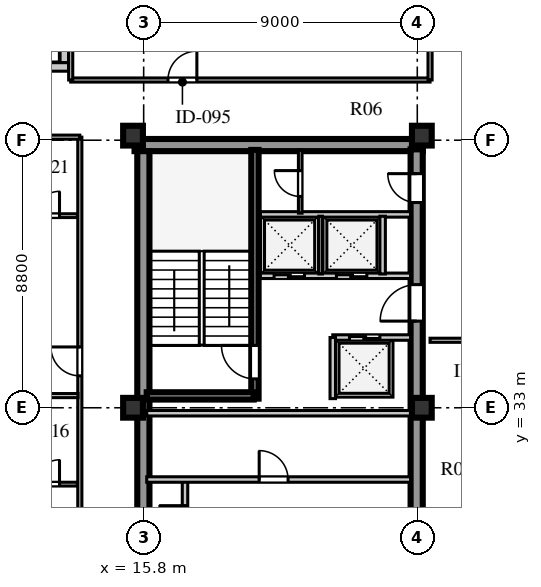
"""IFC4 building model, lengths in metres.
Left out: names, types, materials, properties, quantities, classifications, styles, units other than length and angle.
Written with IfcOpenShell. Run it as: python <this file> out.ifc"""

import sys

from ifc_helpers import new_model, si_unit, direction, frame, frame_2d, origin, origin_2d, place, context, subcontext, project, spatial, rectangle, extrude, element, fill, save


model = new_model("IFC4")
c1 = context("Model", 3, precision=1e-05, world=origin(), true_north=direction((0.0, 1.0)))
c2 = subcontext(c1, "Body", "Model", "MODEL_VIEW")
j1 = project(units=[si_unit("LENGTHUNIT", "METRE"), si_unit("PLANEANGLEUNIT", "RADIAN")], contexts=[c1])
p1 = place(None, origin())
s1 = spatial("IfcSite", under=j1, at=p1, CompositionType="ELEMENT")
p2 = place(p1, origin())
s2 = spatial("IfcBuilding", under=s1, at=p2, CompositionType="ELEMENT")
p3 = place(p2, frame((0.0, 0.0, 229.7)))
s3 = spatial("IfcBuildingStorey", under=s2, at=p3, CompositionType="ELEMENT", Elevation=229.7)
p4 = place(p3, frame((15.5, 41.64, 0.0), z_axis=(0.0, 0.0, 1.0), x_axis=(1.0, 0.0, 0.0)))
e1 = element("IfcWall", 1, at=p4, inside=s3, PredefinedType="SHEAR", context=c2, shape_type="SweptSolid", body=[
    extrude(rectangle(XDim=9.48, YDim=0.4, at=frame_2d((4.74, 0.0))), origin(), (0.0, 0.0, 1.0), 3.66),
])
p5 = place(p3, frame((15.79, 15.81, 0.0), z_axis=(0.0, 0.0, 1.0), x_axis=(0.0, 1.0, 0.0)))
e2 = element("IfcWall", 2, at=p5, inside=s3, PredefinedType="SHEAR", context=c2, shape_type="SweptSolid", body=[
    extrude(rectangle(XDim=25.63, YDim=0.4, at=frame_2d((12.815, 0.0))), origin(), (0.0, 0.0, 1.0), 3.66),
])
p6 = place(p3, frame((24.78, 15.74, 0.0), z_axis=(0.0, 0.0, 1.0), x_axis=(0.0, 1.0, 0.0)))
e3 = element("IfcWall", 3, at=p6, inside=s3, PredefinedType="SHEAR", context=c2, shape_type="SweptSolid", body=[
    extrude(rectangle(XDim=25.76, YDim=0.4, at=frame_2d((12.88, 0.0))), origin(), (0.0, 0.0, 1.0), 3.66),
])
p7 = place(p6, frame((1.61, 0.0, 0.0)))
e4 = element("IfcOpeningElement", 4, at=p7, cuts=e3, PredefinedType="OPENING", context=c2, shape_type="SweptSolid", body=[
    extrude(rectangle(XDim=1.2, YDim=2.1, at=frame_2d((0.6, 1.05))), frame((0.0, 0.21, 0.0), z_axis=(0.0, -1.0, 0.0), x_axis=(1.0, 0.0, 0.0)), (0.0, 0.0, 1.0), 0.42),
])
p8 = place(p6, frame((6.78, 0.0, 0.0)))
e5 = element("IfcOpeningElement", 5, at=p8, cuts=e3, PredefinedType="OPENING", context=c2, shape_type="SweptSolid", body=[
    extrude(rectangle(XDim=0.85, YDim=2.06, at=frame_2d((0.425, 1.03))), frame((0.0, 0.21, 0.0), z_axis=(0.0, -1.0, 0.0), x_axis=(1.0, 0.0, 0.0)), (0.0, 0.0, 1.0), 0.42),
])
p9 = place(p6, frame((12.11, 0.0, 0.0)))
e6 = element("IfcOpeningElement", 6, at=p9, cuts=e3, PredefinedType="OPENING", context=c2, shape_type="SweptSolid", body=[
    extrude(rectangle(XDim=1.5, YDim=2.12, at=frame_2d((0.75, 1.06))), frame((0.0, 0.21, 0.0), z_axis=(0.0, -1.0, 0.0), x_axis=(1.0, 0.0, 0.0)), (0.0, 0.0, 1.0), 0.42),
])
p10 = place(p6, frame((20.11, 0.0, 0.0)))
e7 = element("IfcOpeningElement", 7, at=p10, cuts=e3, PredefinedType="OPENING", context=c2, shape_type="SweptSolid", body=[
    extrude(rectangle(XDim=1.2, YDim=2.12, at=frame_2d((0.6, 1.06))), frame((0.0, 0.21, 0.0), z_axis=(0.0, -1.0, 0.0), x_axis=(1.0, 0.0, 0.0)), (0.0, 0.0, 1.0), 0.42),
])
p11 = place(p6, frame((24.01, 0.0, 0.0)))
e8 = element("IfcOpeningElement", 8, at=p11, cuts=e3, PredefinedType="OPENING", context=c2, shape_type="SweptSolid", body=[
    extrude(rectangle(XDim=0.95, YDim=2.1, at=frame_2d((0.475, 1.05))), frame((0.0, 0.21, 0.0), z_axis=(0.0, -1.0, 0.0), x_axis=(1.0, 0.0, 0.0)), (0.0, 0.0, 1.0), 0.42),
])
for number, where, z_axis, x_axis in (
    (9, (15.45, 33.0, 0.0), (0.0, 0.0, 1.0), (1.0, 0.0, 0.0)),
    (10, (15.45, 41.95, 0.0), (0.0, 0.0, 1.0), (1.0, 0.0, 0.0)),
    (11, (24.95, 33.0, 0.0), (0.0, 0.0, 1.0), (1.0, 0.0, 0.0)),
    (12, (24.95, 41.95, 0.0), (0.0, 0.0, 1.0), (1.0, 0.0, 0.0)),
):
    element("IfcColumn", number, at=place(p3, frame(where, z_axis=z_axis, x_axis=x_axis)), inside=s3, PredefinedType="COLUMN", context=c2, shape_type="SweptSolid", body=[
        extrude(rectangle(XDim=0.65, YDim=0.65, at=origin_2d()), origin(), (0.0, 0.0, 1.0), 3.66),
    ])
p12 = place(p3, frame((13.19, 49.32, 0.0), z_axis=(0.0, 0.0, 1.0), x_axis=(0.0, -1.0, 0.0)))
e13 = element("IfcWall", 13, at=p12, inside=s3, PredefinedType="STANDARD", context=c2, shape_type="SweptSolid", body=[
    extrude(rectangle(XDim=4.97, YDim=0.28, at=frame_2d((2.485, 0.0))), origin(), (0.0, 0.0, 1.0), 3.66),
])
p13 = place(p3, frame((13.33, 44.21, 0.0), z_axis=(0.0, 0.0, 1.0), x_axis=(-1.0, 0.0, 0.0)))
e14 = element("IfcWall", 14, at=p13, inside=s3, PredefinedType="STANDARD", context=c2, shape_type="SweptSolid", body=[
    extrude(rectangle(XDim=5.53, YDim=0.28, at=frame_2d((2.765, 0.0))), origin(), (0.0, 0.0, 1.0), 3.66),
])
p14 = place(p3, frame((17.16, 26.58, 0.0), z_axis=(0.0, 0.0, 1.0), x_axis=(0.0, 1.0, 0.0)))
e15 = element("IfcWall", 15, at=p14, inside=s3, PredefinedType="SOLIDWALL", context=c2, shape_type="SweptSolid", body=[
    extrude(rectangle(XDim=4.02, YDim=0.18, at=frame_2d((2.01, 0.0))), origin(), (0.0, 0.0, 1.0), 3.66),
])
p15 = place(p14, frame((2.35, 0.0, 0.0)))
e16 = element("IfcOpeningElement", 16, at=p15, cuts=e15, PredefinedType="OPENING", context=c2, shape_type="SweptSolid", body=[
    extrude(rectangle(XDim=0.85, YDim=2.06, at=frame_2d((0.425, 1.03))), frame((0.0, 0.1, 0.0), z_axis=(0.0, -1.0, 0.0), x_axis=(1.0, 0.0, 0.0)), (0.0, 0.0, 1.0), 0.2),
])
p16 = place(p3, frame((15.9, 30.64, 0.0), z_axis=(0.0, 0.0, 1.0), x_axis=(1.0, 0.0, 0.0)))
e17 = element("IfcWall", 17, at=p16, inside=s3, PredefinedType="SOLIDWALL", context=c2, shape_type="SweptSolid", body=[
    extrude(rectangle(XDim=8.68, YDim=0.18, at=frame_2d((4.34, 0.0))), origin(), (0.0, 0.0, 1.0), 3.66),
])
p17 = place(p16, frame((3.7, 0.0, 0.0)))
e18 = element("IfcOpeningElement", 18, at=p17, cuts=e17, PredefinedType="OPENING", context=c2, shape_type="SweptSolid", body=[
    extrude(rectangle(XDim=0.95, YDim=2.1, at=frame_2d((0.475, 1.05))), frame((0.0, 0.1, 0.0), z_axis=(0.0, -1.0, 0.0), x_axis=(1.0, 0.0, 0.0)), (0.0, 0.0, 1.0), 0.2),
])
p18 = place(p3, frame((15.9, 32.82, 0.0), z_axis=(0.0, 0.0, 1.0), x_axis=(1.0, 0.0, 0.0)))
e19 = element("IfcWall", 19, at=p18, inside=s3, PredefinedType="SOLIDWALL", context=c2, shape_type="SweptSolid", body=[
    extrude(rectangle(XDim=8.68, YDim=0.18, at=frame_2d((4.34, 0.0))), origin(), (0.0, 0.0, 1.0), 3.06),
])
p19 = place(p3, frame((19.46, 33.3, 0.0), z_axis=(0.0, 0.0, 1.0), x_axis=(0.0, 1.0, 0.0)))
e20 = element("IfcWall", 20, at=p19, inside=s3, PredefinedType="SHEAR", context=c2, shape_type="SweptSolid", body=[
    extrude(rectangle(XDim=8.18, YDim=0.24, at=frame_2d((4.09, 0.0))), origin(), (0.0, 0.0, 1.0), 3.9),
])
p20 = place(p19, frame((0.65, 0.0, 0.0)))
e21 = element("IfcOpeningElement", 21, at=p20, cuts=e20, PredefinedType="OPENING", context=c2, shape_type="SweptSolid", body=[
    extrude(rectangle(XDim=1.1, YDim=2.1, at=frame_2d((0.55, 1.05))), frame((0.0, 0.13, 0.0), z_axis=(0.0, -1.0, 0.0), x_axis=(1.0, 0.0, 0.0)), (0.0, 0.0, 1.0), 0.26),
])
p21 = place(p3, frame((15.9, 33.39, 0.0), z_axis=(0.0, 0.0, 1.0), x_axis=(1.0, 0.0, 0.0)))
e22 = element("IfcWall", 22, at=p21, inside=s3, PredefinedType="SHEAR", context=c2, shape_type="SweptSolid", body=[
    extrude(rectangle(XDim=3.52, YDim=0.24, at=frame_2d((1.76, 0.0))), origin(), (0.0, 0.0, 1.0), 3.9),
])
p22 = place(p3, frame((22.02, 35.31, 0.0), z_axis=(0.0, 0.0, 1.0), x_axis=(1.0, 0.0, 0.0)))
e23 = element("IfcWall", 23, at=p22, inside=s3, PredefinedType="SOLIDWALL", context=c2, shape_type="SweptSolid", body=[
    extrude(rectangle(XDim=2.56, YDim=0.18, at=frame_2d((1.28, 0.0))), origin(), (0.0, 0.0, 1.0), 3.66),
])
p23 = place(p22, frame((0.55, 0.0, 0.0)))
e24 = element("IfcOpeningElement", 24, at=p23, cuts=e23, PredefinedType="OPENING", context=c2, shape_type="SweptSolid", body=[
    extrude(rectangle(XDim=1.0, YDim=2.1, at=frame_2d((0.5, 1.05))), frame((0.0, 0.1, 0.0), z_axis=(0.0, -1.0, 0.0), x_axis=(1.0, 0.0, 0.0)), (0.0, 0.0, 1.0), 0.2),
])
p24 = place(p3, frame((22.02, 33.3, 0.0), z_axis=(0.0, 0.0, 1.0), x_axis=(0.0, 1.0, 0.0)))
e25 = element("IfcWall", 25, at=p24, inside=s3, PredefinedType="SOLIDWALL", context=c2, shape_type="SweptSolid", body=[
    extrude(rectangle(XDim=2.01, YDim=0.18, at=frame_2d((1.005, 0.0))), origin(), (0.0, 0.0, 1.0), 3.66),
])
p25 = place(p3, frame((19.64, 37.34, 0.0), z_axis=(0.0, 0.0, 1.0), x_axis=(1.0, 0.0, 0.0)))
e26 = element("IfcWall", 26, at=p25, inside=s3, PredefinedType="SOLIDWALL", context=c2, shape_type="SweptSolid", body=[
    extrude(rectangle(XDim=4.94, YDim=0.18, at=frame_2d((2.47, 0.0))), origin(), (0.0, 0.0, 1.0), 3.66),
])
p26 = place(p25, frame((0.45, 0.0, 0.0)))
e27 = element("IfcOpeningElement", 27, at=p26, cuts=e26, PredefinedType="OPENING", context=c2, shape_type="SweptSolid", body=[
    extrude(rectangle(XDim=1.0, YDim=2.1, at=frame_2d((0.5, 1.05))), frame((0.0, 0.1, 0.0), z_axis=(0.0, -1.0, 0.0), x_axis=(1.0, 0.0, 0.0)), (0.0, 0.0, 1.0), 0.2),
])
p27 = place(p25, frame((2.5, 0.0, 0.0)))
e28 = element("IfcOpeningElement", 28, at=p27, cuts=e26, PredefinedType="OPENING", context=c2, shape_type="SweptSolid", body=[
    extrude(rectangle(XDim=1.0, YDim=2.1, at=frame_2d((0.5, 1.05))), frame((0.0, 0.1, 0.0), z_axis=(0.0, -1.0, 0.0), x_axis=(1.0, 0.0, 0.0)), (0.0, 0.0, 1.0), 0.2),
])
p28 = place(p3, frame((19.64, 39.36, 0.0), z_axis=(0.0, 0.0, 1.0), x_axis=(1.0, 0.0, 0.0)))
e29 = element("IfcWall", 29, at=p28, inside=s3, PredefinedType="SOLIDWALL", context=c2, shape_type="SweptSolid", body=[
    extrude(rectangle(XDim=4.94, YDim=0.18, at=frame_2d((2.47, 0.0))), origin(), (0.0, 0.0, 1.0), 3.66),
])
p29 = place(p3, frame((21.62, 37.4, 0.0), z_axis=(0.0, 0.0, 1.0), x_axis=(0.0, 1.0, 0.0)))
e30 = element("IfcWall", 30, at=p29, inside=s3, PredefinedType="PARTITIONING", context=c2, shape_type="SweptSolid", body=[
    extrude(rectangle(XDim=1.9, YDim=0.12, at=frame_2d((0.95, 0.0))), origin(), (0.0, 0.0, 1.0), 3.66),
])
p30 = place(p3, frame((23.66, 37.4, 0.0), z_axis=(0.0, 0.0, 1.0), x_axis=(0.0, 1.0, 0.0)))
e31 = element("IfcWall", 31, at=p30, inside=s3, PredefinedType="SOLIDWALL", context=c2, shape_type="SweptSolid", body=[
    extrude(rectangle(XDim=1.9, YDim=0.18, at=frame_2d((0.95, 0.0))), origin(), (0.0, 0.0, 1.0), 3.66),
])
p31 = place(p3, frame((20.95, 39.4, 0.0), z_axis=(0.0, 0.0, 1.0), x_axis=(0.0, 1.0, 0.0)))
e32 = element("IfcWall", 32, at=p31, inside=s3, PredefinedType="PARTITIONING", context=c2, shape_type="SweptSolid", body=[
    extrude(rectangle(XDim=2.08, YDim=0.12, at=frame_2d((1.04, 0.0))), origin(), (0.0, 0.0, 1.0), 3.66),
])
p32 = place(p31, frame((0.55, 0.0, 0.0)))
e33 = element("IfcOpeningElement", 33, at=p32, cuts=e32, PredefinedType="OPENING", context=c2, shape_type="SweptSolid", body=[
    extrude(rectangle(XDim=0.85, YDim=2.06, at=frame_2d((0.425, 1.03))), frame((0.0, 0.07, 0.0), z_axis=(0.0, -1.0, 0.0), x_axis=(1.0, 0.0, 0.0)), (0.0, 0.0, 1.0), 0.14),
])
p33 = place(p3, frame((25.22, 35.22, 0.0), z_axis=(0.0, 0.0, 1.0), x_axis=(1.0, 0.0, 0.0)))
e34 = element("IfcWall", 34, at=p33, inside=s3, PredefinedType="PARTITIONING", context=c2, shape_type="SweptSolid", body=[
    extrude(rectangle(XDim=9.5, YDim=0.135, at=frame_2d((4.75, 0.0))), origin(), (0.0, 0.0, 1.0), 3.66),
])
p34 = place(p33, frame((1.2, 0.0, 0.0)))
e35 = element("IfcOpeningElement", 35, at=p34, cuts=e34, PredefinedType="OPENING", context=c2, shape_type="SweptSolid", body=[
    extrude(rectangle(XDim=1.0, YDim=2.08, at=frame_2d((0.5, 1.04))), frame((0.0, 0.078, 0.0), z_axis=(0.0, -1.0, 0.0), x_axis=(1.0, 0.0, 0.0)), (0.0, 0.0, 1.0), 0.155),
])
p35 = place(p33, frame((6.2, 0.0, 0.0)))
e36 = element("IfcOpeningElement", 36, at=p35, cuts=e34, PredefinedType="OPENING", context=c2, shape_type="SweptSolid", body=[
    extrude(rectangle(XDim=0.9, YDim=2.08, at=frame_2d((0.45, 1.04))), frame((0.0, 0.078, 0.0), z_axis=(0.0, -1.0, 0.0), x_axis=(1.0, 0.0, 0.0)), (0.0, 0.0, 1.0), 0.155),
])
p36 = place(p3, frame((13.4, 43.78, 0.0), z_axis=(0.0, 0.0, 1.0), x_axis=(1.0, 0.0, 0.0)))
e37 = element("IfcWall", 37, at=p36, inside=s3, PredefinedType="PARTITIONING", context=c2, shape_type="SweptSolid", body=[
    extrude(rectangle(XDim=11.82, YDim=0.135, at=frame_2d((5.91, 0.0))), origin(), (0.0, 0.0, 1.0), 3.66),
])
p37 = place(p36, frame((3.2, 0.0, 0.0)))
e38 = element("IfcOpeningElement", 38, at=p37, cuts=e37, PredefinedType="OPENING", context=c2, shape_type="SweptSolid", body=[
    extrude(rectangle(XDim=0.95, YDim=2.08, at=frame_2d((0.475, 1.04))), frame((0.0, 0.078, 0.0), z_axis=(0.0, -1.0, 0.0), x_axis=(1.0, 0.0, 0.0)), (0.0, 0.0, 1.0), 0.155),
])
p38 = place(p3, frame((13.4, 43.78, 0.0), z_axis=(0.0, 0.0, 1.0), x_axis=(0.0, 1.0, 0.0)))
e39 = element("IfcWall", 39, at=p38, inside=s3, PredefinedType="PARTITIONING", context=c2, shape_type="SweptSolid", body=[
    extrude(rectangle(XDim=5.54, YDim=0.135, at=frame_2d((2.77, 0.0))), origin(), (0.0, 0.0, 1.0), 3.66),
])
p39 = place(p3, frame((25.22, 43.78, 0.0), z_axis=(0.0, 0.0, 1.0), x_axis=(0.0, 1.0, 0.0)))
e40 = element("IfcWall", 40, at=p39, inside=s3, PredefinedType="PARTITIONING", context=c2, shape_type="SweptSolid", body=[
    extrude(rectangle(XDim=5.54, YDim=0.135, at=frame_2d((2.77, 0.0))), origin(), (0.0, 0.0, 1.0), 3.21),
])
p40 = place(p3, frame((13.7, 15.3, 0.0), z_axis=(0.0, 0.0, 1.0), x_axis=(0.0, 1.0, 0.0)))
e41 = element("IfcWall", 41, at=p40, inside=s3, PredefinedType="PARTITIONING", context=c2, shape_type="SweptSolid", body=[
    extrude(rectangle(XDim=26.6, YDim=0.135, at=frame_2d((13.3, 0.0))), origin(), (0.0, 0.0, 1.0), 3.66),
])
p41 = place(p40, frame((0.65, 0.0, 0.0)))
e42 = element("IfcOpeningElement", 42, at=p41, cuts=e41, PredefinedType="OPENING", context=c2, shape_type="SweptSolid", body=[
    extrude(rectangle(XDim=0.95, YDim=2.1, at=frame_2d((0.475, 1.05))), frame((0.0, 0.078, 0.0), z_axis=(0.0, -1.0, 0.0), x_axis=(1.0, 0.0, 0.0)), (0.0, 0.0, 1.0), 0.155),
])
p42 = place(p40, frame((9.8, 0.0, 0.0)))
e43 = element("IfcOpeningElement", 43, at=p42, cuts=e41, PredefinedType="OPENING", context=c2, shape_type="SweptSolid", body=[
    extrude(rectangle(XDim=0.95, YDim=2.1, at=frame_2d((0.475, 1.05))), frame((0.0, 0.078, 0.0), z_axis=(0.0, -1.0, 0.0), x_axis=(1.0, 0.0, 0.0)), (0.0, 0.0, 1.0), 0.155),
])
p43 = place(p40, frame((18.75, 0.0, 0.0)))
e44 = element("IfcOpeningElement", 44, at=p43, cuts=e41, PredefinedType="OPENING", context=c2, shape_type="SweptSolid", body=[
    extrude(rectangle(XDim=0.95, YDim=2.1, at=frame_2d((0.475, 1.05))), frame((0.0, 0.078, 0.0), z_axis=(0.0, -1.0, 0.0), x_axis=(1.0, 0.0, 0.0)), (0.0, 0.0, 1.0), 0.155),
])
p44 = place(p3, frame((8.08, 41.9, 0.0), z_axis=(0.0, 0.0, 1.0), x_axis=(1.0, 0.0, 0.0)))
e45 = element("IfcWall", 45, at=p44, inside=s3, PredefinedType="PARTITIONING", context=c2, shape_type="SweptSolid", body=[
    extrude(rectangle(XDim=5.62, YDim=0.135, at=frame_2d((2.81, 0.0))), origin(), (0.0, 0.0, 1.0), 3.21),
])
p45 = place(p3, frame((10.45, 30.488, 0.0), z_axis=(0.0, 0.0, 1.0), x_axis=(1.0, 0.0, 0.0)))
e46 = element("IfcWall", 46, at=p45, inside=s3, PredefinedType="PLUMBINGWALL", context=c2, shape_type="SweptSolid", body=[
    extrude(rectangle(XDim=3.17, YDim=0.125, at=frame_2d((1.585, 0.0))), origin(), (0.0, 0.0, 1.0), 3.66),
])
p46 = place(p45, frame((0.16, 0.0, 0.0)))
e47 = element("IfcOpeningElement", 47, at=p46, cuts=e46, PredefinedType="OPENING", context=c2, shape_type="SweptSolid", body=[
    extrude(rectangle(XDim=0.8, YDim=2.05, at=frame_2d((0.4, 1.025))), frame((0.0, 0.073, 0.0), z_axis=(0.0, -1.0, 0.0), x_axis=(1.0, 0.0, 0.0)), (0.0, 0.0, 1.0), 0.145),
])
p47 = place(p45, frame((1.782, 0.0, 0.0)))
e48 = element("IfcOpeningElement", 48, at=p47, cuts=e46, PredefinedType="OPENING", context=c2, shape_type="SweptSolid", body=[
    extrude(rectangle(XDim=0.8, YDim=2.05, at=frame_2d((0.4, 1.025))), frame((0.0, 0.073, 0.0), z_axis=(0.0, -1.0, 0.0), x_axis=(1.0, 0.0, 0.0)), (0.0, 0.0, 1.0), 0.145),
])
p48 = place(p3, frame((8.08, 33.4, 0.0), z_axis=(0.0, 0.0, 1.0), x_axis=(1.0, 0.0, 0.0)))
e49 = element("IfcWall", 49, at=p48, inside=s3, PredefinedType="PARTITIONING", context=c2, shape_type="SweptSolid", body=[
    extrude(rectangle(XDim=5.56, YDim=0.135, at=frame_2d((2.78, 0.0))), origin(), (0.0, 0.0, 1.0), 3.66),
])
p49 = place(p3, frame((10.45, 39.318, 0.0), z_axis=(0.0, 0.0, 1.0), x_axis=(1.0, 0.0, 0.0)))
e50 = element("IfcWall", 50, at=p49, inside=s3, PredefinedType="PLUMBINGWALL", context=c2, shape_type="SweptSolid", body=[
    extrude(rectangle(XDim=3.17, YDim=0.125, at=frame_2d((1.585, 0.0))), origin(), (0.0, 0.0, 1.0), 3.66),
])
p50 = place(p49, frame((0.16, 0.0, 0.0)))
e51 = element("IfcOpeningElement", 51, at=p50, cuts=e50, PredefinedType="OPENING", context=c2, shape_type="SweptSolid", body=[
    extrude(rectangle(XDim=0.8, YDim=2.05, at=frame_2d((0.4, 1.025))), frame((0.0, 0.073, 0.0), z_axis=(0.0, -1.0, 0.0), x_axis=(1.0, 0.0, 0.0)), (0.0, 0.0, 1.0), 0.145),
])
p51 = place(p49, frame((1.782, 0.0, 0.0)))
e52 = element("IfcOpeningElement", 52, at=p51, cuts=e50, PredefinedType="OPENING", context=c2, shape_type="SweptSolid", body=[
    extrude(rectangle(XDim=0.8, YDim=2.05, at=frame_2d((0.4, 1.025))), frame((0.0, 0.073, 0.0), z_axis=(0.0, -1.0, 0.0), x_axis=(1.0, 0.0, 0.0)), (0.0, 0.0, 1.0), 0.145),
])
p52 = place(p15, origin())
e53 = element("IfcDoor", 53, at=p52, inside=s3, OperationType="SINGLE_SWING_RIGHT", PredefinedType="DOOR", context=c2, shape_type="SweptSolid", body=[
    extrude(rectangle(XDim=0.85, YDim=2.06, at=frame_2d((0.425, 1.03))), frame((0.0, 0.025, 0.0), z_axis=(0.0, -1.0, 0.0), x_axis=(1.0, 0.0, 0.0)), (0.0, 0.0, 1.0), 0.05),
])
fill(e16, e53)
p53 = place(p17, frame((0.95, 0.0, 0.0), z_axis=(0.0, 0.0, 1.0), x_axis=(-1.0, 0.0, 0.0)))
e54 = element("IfcDoor", 54, at=p53, inside=s3, OperationType="SINGLE_SWING_RIGHT", PredefinedType="DOOR", context=c2, shape_type="SweptSolid", body=[
    extrude(rectangle(XDim=0.95, YDim=2.1, at=frame_2d((0.475, 1.05))), frame((0.0, 0.025, 0.0), z_axis=(0.0, -1.0, 0.0), x_axis=(1.0, 0.0, 0.0)), (0.0, 0.0, 1.0), 0.05),
])
fill(e18, e54)
p54 = place(p20, origin())
e55 = element("IfcDoor", 55, at=p54, inside=s3, OperationType="SINGLE_SWING_RIGHT", PredefinedType="DOOR", context=c2, shape_type="SweptSolid", body=[
    extrude(rectangle(XDim=1.1, YDim=2.1, at=frame_2d((0.55, 1.05))), frame((0.0, 0.025, 0.0), z_axis=(0.0, -1.0, 0.0), x_axis=(1.0, 0.0, 0.0)), (0.0, 0.0, 1.0), 0.05),
])
fill(e21, e55)
p55 = place(p10, frame((1.2, 0.0, 0.0), z_axis=(0.0, 0.0, 1.0), x_axis=(-1.0, 0.0, 0.0)))
e56 = element("IfcDoor", 56, at=p55, inside=s3, OperationType="SINGLE_SWING_RIGHT", PredefinedType="DOOR", context=c2, shape_type="SweptSolid", body=[
    extrude(rectangle(XDim=1.2, YDim=2.12, at=frame_2d((0.6, 1.06))), frame((0.0, 0.025, 0.0), z_axis=(0.0, -1.0, 0.0), x_axis=(1.0, 0.0, 0.0)), (0.0, 0.0, 1.0), 0.05),
])
fill(e7, e56)
p56 = place(p26, frame((1.0, 0.0, 0.0), z_axis=(0.0, 0.0, 1.0), x_axis=(-1.0, 0.0, 0.0)))
e57 = element("IfcDoor", 57, at=p56, inside=s3, OperationType="DOUBLE_DOOR_SLIDING", PredefinedType="DOOR", context=c2, shape_type="SweptSolid", body=[
    extrude(rectangle(XDim=1.0, YDim=2.1, at=frame_2d((0.5, 1.05))), frame((0.0, 0.025, 0.0), z_axis=(0.0, -1.0, 0.0), x_axis=(1.0, 0.0, 0.0)), (0.0, 0.0, 1.0), 0.05),
])
fill(e27, e57)
p57 = place(p27, frame((1.0, 0.0, 0.0), z_axis=(0.0, 0.0, 1.0), x_axis=(-1.0, 0.0, 0.0)))
e58 = element("IfcDoor", 58, at=p57, inside=s3, OperationType="DOUBLE_DOOR_SLIDING", PredefinedType="DOOR", context=c2, shape_type="SweptSolid", body=[
    extrude(rectangle(XDim=1.0, YDim=2.1, at=frame_2d((0.5, 1.05))), frame((0.0, 0.025, 0.0), z_axis=(0.0, -1.0, 0.0), x_axis=(1.0, 0.0, 0.0)), (0.0, 0.0, 1.0), 0.05),
])
fill(e28, e58)
p58 = place(p23, origin())
e59 = element("IfcDoor", 59, at=p58, inside=s3, OperationType="DOUBLE_DOOR_SLIDING", PredefinedType="DOOR", context=c2, shape_type="SweptSolid", body=[
    extrude(rectangle(XDim=1.0, YDim=2.1, at=frame_2d((0.5, 1.05))), frame((0.0, 0.025, 0.0), z_axis=(0.0, -1.0, 0.0), x_axis=(1.0, 0.0, 0.0)), (0.0, 0.0, 1.0), 0.05),
])
fill(e24, e59)
p59 = place(p32, origin())
e60 = element("IfcDoor", 60, at=p59, inside=s3, OperationType="SINGLE_SWING_RIGHT", PredefinedType="DOOR", context=c2, shape_type="SweptSolid", body=[
    extrude(rectangle(XDim=0.85, YDim=2.06, at=frame_2d((0.425, 1.03))), frame((0.0, 0.025, 0.0), z_axis=(0.0, -1.0, 0.0), x_axis=(1.0, 0.0, 0.0)), (0.0, 0.0, 1.0), 0.05),
])
fill(e33, e60)
p60 = place(p11, frame((0.95, 0.0, 0.0), z_axis=(0.0, 0.0, 1.0), x_axis=(-1.0, 0.0, 0.0)))
e61 = element("IfcDoor", 61, at=p60, inside=s3, OperationType="SINGLE_SWING_LEFT", PredefinedType="DOOR", context=c2, shape_type="SweptSolid", body=[
    extrude(rectangle(XDim=0.95, YDim=2.1, at=frame_2d((0.475, 1.05))), frame((0.0, 0.025, 0.0), z_axis=(0.0, -1.0, 0.0), x_axis=(1.0, 0.0, 0.0)), (0.0, 0.0, 1.0), 0.05),
])
fill(e8, e61)
p61 = place(p37, origin())
e62 = element("IfcDoor", 62, at=p61, inside=s3, OperationType="SINGLE_SWING_RIGHT", PredefinedType="DOOR", context=c2, shape_type="SweptSolid", body=[
    extrude(rectangle(XDim=0.95, YDim=2.08, at=frame_2d((0.475, 1.04))), frame((0.0, 0.025, 0.0), z_axis=(0.0, -1.0, 0.0), x_axis=(1.0, 0.0, 0.0)), (0.0, 0.0, 1.0), 0.05),
])
fill(e38, e62)
p62 = place(p47, origin())
e63 = element("IfcDoor", 63, at=p62, inside=s3, OperationType="SINGLE_SWING_RIGHT", PredefinedType="DOOR", context=c2, shape_type="SweptSolid", body=[
    extrude(rectangle(XDim=0.8, YDim=2.05, at=frame_2d((0.4, 1.025))), frame((0.0, 0.025, 0.0), z_axis=(0.0, -1.0, 0.0), x_axis=(1.0, 0.0, 0.0)), (0.0, 0.0, 1.0), 0.05),
])
fill(e48, e63)
p63 = place(p51, origin())
e64 = element("IfcDoor", 64, at=p63, inside=s3, OperationType="SINGLE_SWING_RIGHT", PredefinedType="DOOR", context=c2, shape_type="SweptSolid", body=[
    extrude(rectangle(XDim=0.8, YDim=2.05, at=frame_2d((0.4, 1.025))), frame((0.0, 0.025, 0.0), z_axis=(0.0, -1.0, 0.0), x_axis=(1.0, 0.0, 0.0)), (0.0, 0.0, 1.0), 0.05),
])
fill(e52, e64)
p64 = place(p43, frame((0.95, 0.0, 0.0), z_axis=(0.0, 0.0, 1.0), x_axis=(-1.0, 0.0, 0.0)))
e65 = element("IfcDoor", 65, at=p64, inside=s3, OperationType="SINGLE_SWING_LEFT", PredefinedType="DOOR", context=c2, shape_type="SweptSolid", body=[
    extrude(rectangle(XDim=0.95, YDim=2.1, at=frame_2d((0.475, 1.05))), frame((0.0, 0.025, 0.0), z_axis=(0.0, -1.0, 0.0), x_axis=(1.0, 0.0, 0.0)), (0.0, 0.0, 1.0), 0.05),
])
fill(e44, e65)
save(model, sys.argv[1])
